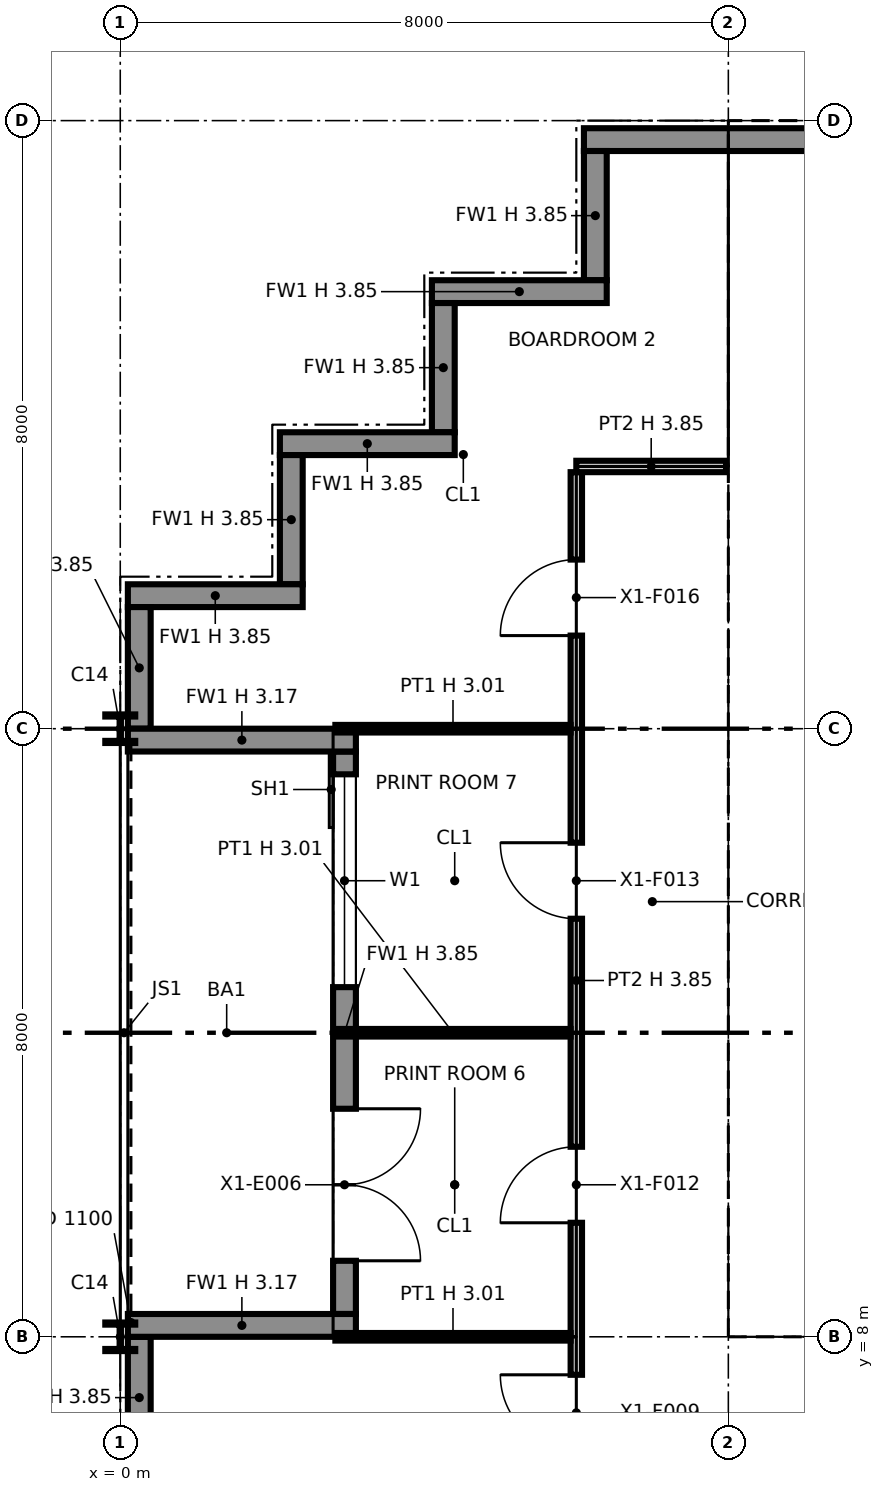
"""IFC4 building model, lengths in metres.
Left out: names, types, materials, properties, quantities, classifications, styles, units other than length and angle.
Written with IfcOpenShell. Run it as: python <this file> out.ifc"""

import sys

from ifc_helpers import new_model, si_unit, direction, frame, frame_2d, origin, origin_2d, place, context, subcontext, project, spatial, polyline, rectangle, i_section, outline, extrude, element, fill, save


model = new_model("IFC4")
c1 = context("Model", 3, precision=1e-05, world=origin(), true_north=direction((0.0, 1.0)))
c2 = subcontext(c1, "Body", "Model", "MODEL_VIEW")
j1 = project(units=[si_unit("LENGTHUNIT", "METRE"), si_unit("PLANEANGLEUNIT", "RADIAN")], contexts=[c1])
p1 = place(None, origin())
s1 = spatial("IfcSite", under=j1, at=p1, CompositionType="ELEMENT")
p2 = place(p1, origin())
s2 = spatial("IfcBuilding", under=s1, at=p2, CompositionType="ELEMENT")
p3 = place(p2, frame((0.0, 0.0, 247.0)))
s3 = spatial("IfcBuildingStorey", under=s2, at=p3, CompositionType="ELEMENT", Elevation=247.0)
for number, where, z_axis, x_axis in (
    (1, (0.0, 8.0, 0.0), (0.0, 0.0, 1.0), (1.0, 0.0, 0.0)),
    (2, (0.0, 16.0, 0.0), (0.0, 0.0, 1.0), (1.0, 0.0, 0.0)),
):
    element("IfcColumn", number, at=place(p3, frame(where, z_axis=z_axis, x_axis=x_axis)), inside=s3, PredefinedType="COLUMN", context=c2, shape_type="SweptSolid", body=[
        extrude(i_section(OverallWidth=0.394, OverallDepth=0.376, WebThickness=0.017, FlangeThickness=0.028, at=origin_2d()), origin(), (0.0, 0.0, 1.0), 3.85),
    ])
for number, where, z_axis, x_axis in (
    (3, (8.0, 8.0, 0.0), (0.0, 0.0, 1.0), (1.0, 0.0, 0.0)),
    (4, (8.0, 16.0, 0.0), (0.0, 0.0, 1.0), (1.0, 0.0, 0.0)),
):
    element("IfcColumn", number, at=place(p3, frame(where, z_axis=z_axis, x_axis=x_axis)), inside=s3, PredefinedType="COLUMN", context=c2, shape_type="SweptSolid", body=[
        extrude(i_section(OverallWidth=0.371, OverallDepth=0.361, WebThickness=0.012, FlangeThickness=0.02, at=origin_2d()), origin(), (0.0, 0.0, 1.0), 3.85),
    ])
p4 = place(p3, frame((8.0, 24.0, 0.0), z_axis=(0.0, 0.0, 1.0), x_axis=(1.0, 0.0, 0.0)))
e5 = element("IfcColumn", 5, at=p4, inside=s3, PredefinedType="COLUMN", context=c2, shape_type="SweptSolid", body=[
    extrude(i_section(OverallWidth=0.401, OverallDepth=0.399, WebThickness=0.025, FlangeThickness=0.04, at=origin_2d()), origin(), (0.0, 0.0, 1.0), 3.85),
])
p5 = place(p3, frame((32.0, 23.75, 0.0), z_axis=(0.0, 0.0, 1.0), x_axis=(-1.0, 0.0, 0.0)))
e6 = element("IfcWall", 6, at=p5, inside=s3, PredefinedType="SOLIDWALL", context=c2, shape_type="SweptSolid", body=[
    extrude(rectangle(XDim=25.9, YDim=0.3, at=frame_2d((12.95, 0.0))), origin(), (0.0, 0.0, 1.0), 3.85),
])
p6 = place(p3, frame((6.25, 23.6, 0.0), z_axis=(0.0, 0.0, 1.0), x_axis=(0.0, -1.0, 0.0)))
e7 = element("IfcWall", 7, at=p6, inside=s3, PredefinedType="SOLIDWALL", context=c2, shape_type="SweptSolid", body=[
    extrude(rectangle(XDim=1.7, YDim=0.3, at=frame_2d((0.85, 0.0))), origin(), (0.0, 0.0, 1.0), 3.85),
])
p7 = place(p3, frame((6.4, 21.75, 0.0), z_axis=(0.0, 0.0, 1.0), x_axis=(-1.0, 0.0, 0.0)))
e8 = element("IfcWall", 8, at=p7, inside=s3, PredefinedType="SOLIDWALL", context=c2, shape_type="SweptSolid", body=[
    extrude(rectangle(XDim=2.3, YDim=0.3, at=frame_2d((1.15, 0.0))), origin(), (0.0, 0.0, 1.0), 3.85),
])
p8 = place(p3, frame((4.25, 21.6, 0.0), z_axis=(0.0, 0.0, 1.0), x_axis=(0.0, -1.0, 0.0)))
e9 = element("IfcWall", 9, at=p8, inside=s3, PredefinedType="SOLIDWALL", context=c2, shape_type="SweptSolid", body=[
    extrude(rectangle(XDim=1.7, YDim=0.3, at=frame_2d((0.85, 0.0))), origin(), (0.0, 0.0, 1.0), 3.85),
])
p9 = place(p3, frame((4.4, 19.75, 0.0), z_axis=(0.0, 0.0, 1.0), x_axis=(-1.0, 0.0, 0.0)))
e10 = element("IfcWall", 10, at=p9, inside=s3, PredefinedType="SOLIDWALL", context=c2, shape_type="SweptSolid", body=[
    extrude(rectangle(XDim=2.3, YDim=0.3, at=frame_2d((1.15, 0.0))), origin(), (0.0, 0.0, 1.0), 3.85),
])
p10 = place(p3, frame((2.25, 19.6, 0.0), z_axis=(0.0, 0.0, 1.0), x_axis=(0.0, -1.0, 0.0)))
e11 = element("IfcWall", 11, at=p10, inside=s3, PredefinedType="SOLIDWALL", context=c2, shape_type="SweptSolid", body=[
    extrude(rectangle(XDim=1.7, YDim=0.3, at=frame_2d((0.85, 0.0))), origin(), (0.0, 0.0, 1.0), 3.85),
])
p11 = place(p3, frame((2.4, 17.75, 0.0), z_axis=(0.0, 0.0, 1.0), x_axis=(-1.0, 0.0, 0.0)))
e12 = element("IfcWall", 12, at=p11, inside=s3, PredefinedType="SOLIDWALL", context=c2, shape_type="SweptSolid", body=[
    extrude(rectangle(XDim=2.3, YDim=0.3, at=frame_2d((1.15, 0.0))), origin(), (0.0, 0.0, 1.0), 3.85),
])
p12 = place(p3, frame((0.25, 17.6, 0.0), z_axis=(0.0, 0.0, 1.0), x_axis=(0.0, -1.0, 0.0)))
e13 = element("IfcWall", 13, at=p12, inside=s3, PredefinedType="SOLIDWALL", context=c2, shape_type="SweptSolid", body=[
    extrude(rectangle(XDim=1.6, YDim=0.3, at=frame_2d((0.8, 0.0))), origin(), (0.0, 0.0, 1.0), 3.85),
])
p13 = place(p3, frame((2.95, 15.7, 0.0), z_axis=(0.0, 0.0, 1.0), x_axis=(0.0, -1.0, 0.0)))
e14 = element("IfcWall", 14, at=p13, inside=s3, PredefinedType="SOLIDWALL", context=c2, shape_type="SweptSolid", body=[
    extrude(rectangle(XDim=7.4, YDim=0.3, at=frame_2d((3.7, 0.0))), origin(), (0.0, 0.0, 1.0), 3.85),
])
p14 = place(p13, frame((0.3, 0.0, 0.9)))
e15 = element("IfcOpeningElement", 15, at=p14, cuts=e14, PredefinedType="OPENING", context=c2, shape_type="SweptSolid", body=[
    extrude(rectangle(XDim=2.8, YDim=2.2, at=frame_2d((1.4, 1.1))), frame((0.0, 0.16, 0.0), z_axis=(0.0, -1.0, 0.0), x_axis=(1.0, 0.0, 0.0)), (0.0, 0.0, 1.0), 0.32),
])
p15 = place(p13, frame((4.7, 0.0, 0.0)))
e16 = element("IfcOpeningElement", 16, at=p15, cuts=e14, PredefinedType="OPENING", context=c2, shape_type="SweptSolid", body=[
    extrude(rectangle(XDim=2.0, YDim=2.4, at=frame_2d((1.0, 1.2))), frame((0.0, 0.16, 0.0), z_axis=(0.0, -1.0, 0.0), x_axis=(1.0, 0.0, 0.0)), (0.0, 0.0, 1.0), 0.32),
])
for number, where, z_axis, x_axis in (
    (17, (0.1, 15.85, 0.0), (0.0, 0.0, 1.0), (1.0, 0.0, 0.0)),
    (18, (0.1, 8.15, 0.0), (0.0, 0.0, 1.0), (1.0, 0.0, 0.0)),
):
    element("IfcWall", number, at=place(p3, frame(where, z_axis=z_axis, x_axis=x_axis)), inside=s3, PredefinedType="SOLIDWALL", context=c2, shape_type="SweptSolid", body=[
        extrude(rectangle(XDim=3.0, YDim=0.3, at=frame_2d((1.5, 0.0))), origin(), (0.0, 0.0, 1.0), 3.171),
    ])
p16 = place(p3, frame((0.25, 8.0, 0.0), z_axis=(0.0, 0.0, 1.0), x_axis=(0.0, -1.0, 0.0)))
e19 = element("IfcWall", 19, at=p16, inside=s3, PredefinedType="SOLIDWALL", context=c2, shape_type="SweptSolid", body=[
    extrude(rectangle(XDim=1.6, YDim=0.3, at=frame_2d((0.8, 0.0))), origin(), (0.0, 0.0, 1.0), 3.85),
])
p17 = place(p3, frame((8.65, 8.75, 0.0), z_axis=(0.0, 0.0, 1.0), x_axis=(1.0, 0.0, 0.0)))
e20 = element("IfcWall", 20, at=p17, inside=s3, PredefinedType="PARTITIONING", context=c2, shape_type="SweptSolid", body=[
    extrude(outline(polyline([(0.0, 0.0), (14.7, 0.0), (14.7, 3.85), (7.438, 3.85), (7.438, 3.308), (7.262, 3.308), (7.261, 3.85), (0.0, 3.85), (0.0, 0.0)])), frame((0.0, 0.1, 0.0), z_axis=(0.0, -1.0, 0.0), x_axis=(1.0, 0.0, 0.0)), (0.0, 0.0, 1.0), 0.2),
])
p18 = place(p17, frame((1.3, 0.0, 0.0)))
e21 = element("IfcOpeningElement", 21, at=p18, cuts=e20, PredefinedType="OPENING", context=c2, shape_type="SweptSolid", body=[
    extrude(rectangle(XDim=1.4, YDim=2.1, at=frame_2d((0.7, 1.05))), frame((0.0, 0.11, 0.0), z_axis=(0.0, -1.0, 0.0), x_axis=(1.0, 0.0, 0.0)), (0.0, 0.0, 1.0), 0.22),
])
p19 = place(p17, frame((4.6, 0.0, 0.0)))
e22 = element("IfcOpeningElement", 22, at=p19, cuts=e20, PredefinedType="OPENING", context=c2, shape_type="SweptSolid", body=[
    extrude(rectangle(XDim=1.4, YDim=2.1, at=frame_2d((0.7, 1.05))), frame((0.0, 0.11, 0.0), z_axis=(0.0, -1.0, 0.0), x_axis=(1.0, 0.0, 0.0)), (0.0, 0.0, 1.0), 0.22),
])
p20 = place(p17, frame((10.4, 0.0, 0.0)))
e23 = element("IfcOpeningElement", 23, at=p20, cuts=e20, PredefinedType="OPENING", context=c2, shape_type="SweptSolid", body=[
    extrude(rectangle(XDim=1.2, YDim=2.1, at=frame_2d((0.6, 1.05))), frame((0.0, 0.11, 0.0), z_axis=(0.0, -1.0, 0.0), x_axis=(1.0, 0.0, 0.0)), (0.0, 0.0, 1.0), 0.22),
])
p21 = place(p3, frame((8.75, 8.85, 0.0), z_axis=(0.0, 0.0, 1.0), x_axis=(0.0, 1.0, 0.0)))
e24 = element("IfcWall", 24, at=p21, inside=s3, PredefinedType="PARTITIONING", context=c2, shape_type="SweptSolid", body=[
    extrude(outline(polyline([(0.0, 0.0), (14.3, 0.0), (14.3, 3.85), (10.225, 3.85), (10.224, 3.44), (10.076, 3.44), (10.075, 3.85), (7.239, 3.85), (7.238, 3.308), (7.062, 3.308), (7.062, 3.85), (0.0, 3.85), (0.0, 0.0)])), frame((0.0, 0.1, 0.0), z_axis=(0.0, -1.0, 0.0), x_axis=(1.0, 0.0, 0.0)), (0.0, 0.0, 1.0), 0.2),
])
p22 = place(p21, frame((8.3, 0.0, 0.0)))
e25 = element("IfcOpeningElement", 25, at=p22, cuts=e24, PredefinedType="OPENING", context=c2, shape_type="SweptSolid", body=[
    extrude(rectangle(XDim=1.8, YDim=2.1, at=frame_2d((0.9, 1.05))), frame((0.0, 0.11, 0.0), z_axis=(0.0, -1.0, 0.0), x_axis=(1.0, 0.0, 0.0)), (0.0, 0.0, 1.0), 0.22),
])
p23 = place(p3, frame((8.65, 23.25, 0.0), z_axis=(0.0, 0.0, 1.0), x_axis=(1.0, 0.0, 0.0)))
e26 = element("IfcWall", 26, at=p23, inside=s3, PredefinedType="PARTITIONING", context=c2, shape_type="SweptSolid", body=[
    extrude(outline(polyline([(0.0, 0.0), (14.7, 0.0), (14.7, 3.85), (7.438, 3.85), (7.438, 3.308), (7.262, 3.308), (7.261, 3.85), (0.0, 3.85), (0.0, 0.0)])), frame((0.0, 0.1, 0.0), z_axis=(0.0, -1.0, 0.0), x_axis=(1.0, 0.0, 0.0)), (0.0, 0.0, 1.0), 0.2),
])
p24 = place(p3, frame((8.85, 16.0, 0.0), z_axis=(0.0, 0.0, 1.0), x_axis=(1.0, 0.0, 0.0)))
e27 = element("IfcWall", 27, at=p24, inside=s3, PredefinedType="PARTITIONING", context=c2, shape_type="SweptSolid", body=[
    extrude(rectangle(XDim=6.954, YDim=0.6, at=frame_2d((3.477, 0.0))), origin(), (0.0, 0.0, 1.0), 3.308),
])
p25 = place(p3, frame((8.85, 19.9, 0.0), z_axis=(0.0, 0.0, 1.0), x_axis=(1.0, 0.0, 0.0)))
e28 = element("IfcWall", 28, at=p25, inside=s3, PredefinedType="PARTITIONING", context=c2, shape_type="SweptSolid", body=[
    extrude(outline(polyline([(0.0, 0.0), (14.3, 0.0), (14.3, 3.85), (7.239, 3.85), (7.238, 3.308), (7.062, 3.308), (7.062, 3.85), (0.0, 3.85), (0.0, 0.0)])), frame((0.0, 0.1, 0.0), z_axis=(0.0, -1.0, 0.0), x_axis=(1.0, 0.0, 0.0)), (0.0, 0.0, 1.0), 0.2),
])
p26 = place(p25, frame((2.125, 0.0, 0.0)))
e29 = element("IfcOpeningElement", 29, at=p26, cuts=e28, PredefinedType="OPENING", context=c2, shape_type="SweptSolid", body=[
    extrude(rectangle(XDim=0.9, YDim=2.1, at=frame_2d((0.45, 1.05))), frame((0.0, 0.11, 0.0), z_axis=(0.0, -1.0, 0.0), x_axis=(1.0, 0.0, 0.0)), (0.0, 0.0, 1.0), 0.22),
])
p27 = place(p25, frame((5.65, 0.0, 0.0)))
e30 = element("IfcOpeningElement", 30, at=p27, cuts=e28, PredefinedType="OPENING", context=c2, shape_type="SweptSolid", body=[
    extrude(rectangle(XDim=1.1, YDim=2.1, at=frame_2d((0.55, 1.05))), frame((0.0, 0.11, 0.0), z_axis=(0.0, -1.0, 0.0), x_axis=(1.0, 0.0, 0.0)), (0.0, 0.0, 1.0), 0.22),
])
p28 = place(p25, frame((7.95, 0.0, 0.0)))
e31 = element("IfcOpeningElement", 31, at=p28, cuts=e28, PredefinedType="OPENING", context=c2, shape_type="SweptSolid", body=[
    extrude(rectangle(XDim=1.1, YDim=2.1, at=frame_2d((0.55, 1.05))), frame((0.0, 0.11, 0.0), z_axis=(0.0, -1.0, 0.0), x_axis=(1.0, 0.0, 0.0)), (0.0, 0.0, 1.0), 0.22),
])
p29 = place(p25, frame((10.25, 0.0, 0.0)))
e32 = element("IfcOpeningElement", 32, at=p29, cuts=e28, PredefinedType="OPENING", context=c2, shape_type="SweptSolid", body=[
    extrude(rectangle(XDim=1.1, YDim=2.1, at=frame_2d((0.55, 1.05))), frame((0.0, 0.11, 0.0), z_axis=(0.0, -1.0, 0.0), x_axis=(1.0, 0.0, 0.0)), (0.0, 0.0, 1.0), 0.22),
])
p30 = place(p25, frame((12.625, 0.0, 0.0)))
e33 = element("IfcOpeningElement", 33, at=p30, cuts=e28, PredefinedType="OPENING", context=c2, shape_type="SweptSolid", body=[
    extrude(rectangle(XDim=1.1, YDim=2.1, at=frame_2d((0.55, 1.05))), frame((0.0, 0.11, 0.0), z_axis=(0.0, -1.0, 0.0), x_axis=(1.0, 0.0, 0.0)), (0.0, 0.0, 1.0), 0.22),
])
p31 = place(p3, frame((6.0, 6.0, 0.0), z_axis=(0.0, 0.0, 1.0), x_axis=(0.0, 1.0, 0.0)))
e34 = element("IfcWall", 34, at=p31, inside=s3, PredefinedType="PARTITIONING", context=c2, shape_type="SweptSolid", body=[
    extrude(outline(polyline([(0.0, 0.0), (13.375, 0.0), (13.375, 3.85), (10.3, 3.85), (10.298, 3.014), (9.702, 3.014), (9.7, 3.85), (6.3, 3.85), (6.298, 3.014), (5.702, 3.014), (5.7, 3.85), (2.3, 3.85), (2.298, 3.014), (1.702, 3.014), (1.7, 3.85), (0.0, 3.85), (0.0, 0.0)])), frame((0.0, 0.075, 0.0), z_axis=(0.0, -1.0, 0.0), x_axis=(1.0, 0.0, 0.0)), (0.0, 0.0, 1.0), 0.15),
])
p32 = place(p31, frame((0.5, 0.0, 0.0)))
e35 = element("IfcOpeningElement", 35, at=p32, cuts=e34, PredefinedType="OPENING", context=c2, shape_type="SweptSolid", body=[
    extrude(rectangle(XDim=1.0, YDim=2.1, at=frame_2d((0.5, 1.05))), frame((0.0, 0.085, 0.0), z_axis=(0.0, -1.0, 0.0), x_axis=(1.0, 0.0, 0.0)), (0.0, 0.0, 1.0), 0.17),
])
p33 = place(p31, frame((3.5, 0.0, 0.0)))
e36 = element("IfcOpeningElement", 36, at=p33, cuts=e34, PredefinedType="OPENING", context=c2, shape_type="SweptSolid", body=[
    extrude(rectangle(XDim=1.0, YDim=2.1, at=frame_2d((0.5, 1.05))), frame((0.0, 0.085, 0.0), z_axis=(0.0, -1.0, 0.0), x_axis=(1.0, 0.0, 0.0)), (0.0, 0.0, 1.0), 0.17),
])
p34 = place(p31, frame((7.5, 0.0, 0.0)))
e37 = element("IfcOpeningElement", 37, at=p34, cuts=e34, PredefinedType="OPENING", context=c2, shape_type="SweptSolid", body=[
    extrude(rectangle(XDim=1.0, YDim=2.1, at=frame_2d((0.5, 1.05))), frame((0.0, 0.085, 0.0), z_axis=(0.0, -1.0, 0.0), x_axis=(1.0, 0.0, 0.0)), (0.0, 0.0, 1.0), 0.17),
])
p35 = place(p31, frame((11.225, 0.0, 0.0)))
e38 = element("IfcOpeningElement", 38, at=p35, cuts=e34, PredefinedType="OPENING", context=c2, shape_type="SweptSolid", body=[
    extrude(rectangle(XDim=1.0, YDim=2.1, at=frame_2d((0.5, 1.05))), frame((0.0, 0.085, 0.0), z_axis=(0.0, -1.0, 0.0), x_axis=(1.0, 0.0, 0.0)), (0.0, 0.0, 1.0), 0.17),
])
for number, where, z_axis, x_axis in (
    (39, (2.83, 8.0, 0.0), (0.0, 0.0, 1.0), (1.0, 0.0, 0.0)),
    (40, (2.83, 12.0, 0.0), (0.0, 0.0, 1.0), (1.0, 0.0, 0.0)),
    (41, (2.83, 16.0, 0.0), (0.0, 0.0, 1.0), (1.0, 0.0, 0.0)),
):
    element("IfcWall", number, at=place(p3, frame(where, z_axis=z_axis, x_axis=x_axis)), inside=s3, PredefinedType="PARTITIONING", context=c2, shape_type="SweptSolid", body=[
        extrude(rectangle(XDim=3.095, YDim=0.1, at=frame_2d((1.547, 0.0))), origin(), (0.0, 0.0, 1.0), 3.014),
    ])
p36 = place(p3, frame((6.0, 19.45, 0.0), z_axis=(0.0, 0.0, 1.0), x_axis=(1.0, 0.0, 0.0)))
e42 = element("IfcWall", 42, at=p36, inside=s3, PredefinedType="PARTITIONING", context=c2, shape_type="SweptSolid", body=[
    extrude(rectangle(XDim=1.97, YDim=0.15, at=frame_2d((0.985, 0.0))), origin(), (0.0, 0.0, 1.0), 3.85),
])
p37 = place(p14, origin())
e43 = element("IfcWindow", 43, at=p37, inside=s3, PartitioningType="SINGLE_PANEL", PredefinedType="WINDOW", context=c2, shape_type="SweptSolid", body=[
    extrude(rectangle(XDim=2.8, YDim=2.2, at=frame_2d((1.4, 1.1))), frame((0.0, 0.03, 0.0), z_axis=(0.0, -1.0, 0.0), x_axis=(1.0, 0.0, 0.0)), (0.0, 0.0, 1.0), 0.06),
])
fill(e15, e43)
p38 = place(p15, origin())
e44 = element("IfcDoor", 44, at=p38, inside=s3, OperationType="DOUBLE_DOOR_SINGLE_SWING", PredefinedType="DOOR", context=c2, shape_type="SweptSolid", body=[
    extrude(rectangle(XDim=2.0, YDim=2.4, at=frame_2d((1.0, 1.2))), frame((0.0, 0.025, 0.0), z_axis=(0.0, -1.0, 0.0), x_axis=(1.0, 0.0, 0.0)), (0.0, 0.0, 1.0), 0.05),
])
fill(e16, e44)
p39 = place(p22, origin())
e45 = element("IfcDoor", 45, at=p39, inside=s3, OperationType="DOUBLE_DOOR_SINGLE_SWING", PredefinedType="NOTDEFINED", context=c2, shape_type="SweptSolid", body=[
    extrude(rectangle(XDim=1.8, YDim=2.1, at=frame_2d((0.9, 1.05))), frame((0.0, 0.025, 0.0), z_axis=(0.0, -1.0, 0.0), x_axis=(1.0, 0.0, 0.0)), (0.0, 0.0, 1.0), 0.05),
])
fill(e25, e45)
p40 = place(p32, origin())
e46 = element("IfcDoor", 46, at=p40, inside=s3, OperationType="SINGLE_SWING_RIGHT", PredefinedType="DOOR", context=c2, shape_type="SweptSolid", body=[
    extrude(rectangle(XDim=1.0, YDim=2.1, at=frame_2d((0.5, 1.05))), frame((0.0, 0.025, 0.0), z_axis=(0.0, -1.0, 0.0), x_axis=(1.0, 0.0, 0.0)), (0.0, 0.0, 1.0), 0.05),
])
fill(e35, e46)
p41 = place(p33, origin())
e47 = element("IfcDoor", 47, at=p41, inside=s3, OperationType="SINGLE_SWING_LEFT", PredefinedType="DOOR", context=c2, shape_type="SweptSolid", body=[
    extrude(rectangle(XDim=1.0, YDim=2.1, at=frame_2d((0.5, 1.05))), frame((0.0, 0.025, 0.0), z_axis=(0.0, -1.0, 0.0), x_axis=(1.0, 0.0, 0.0)), (0.0, 0.0, 1.0), 0.05),
])
fill(e36, e47)
p42 = place(p34, origin())
e48 = element("IfcDoor", 48, at=p42, inside=s3, OperationType="SINGLE_SWING_RIGHT", PredefinedType="DOOR", context=c2, shape_type="SweptSolid", body=[
    extrude(rectangle(XDim=1.0, YDim=2.1, at=frame_2d((0.5, 1.05))), frame((0.0, 0.025, 0.0), z_axis=(0.0, -1.0, 0.0), x_axis=(1.0, 0.0, 0.0)), (0.0, 0.0, 1.0), 0.05),
])
fill(e37, e48)
p43 = place(p35, origin())
e49 = element("IfcDoor", 49, at=p43, inside=s3, OperationType="SINGLE_SWING_LEFT", PredefinedType="DOOR", context=c2, shape_type="SweptSolid", body=[
    extrude(rectangle(XDim=1.0, YDim=2.1, at=frame_2d((0.5, 1.05))), frame((0.0, 0.025, 0.0), z_axis=(0.0, -1.0, 0.0), x_axis=(1.0, 0.0, 0.0)), (0.0, 0.0, 1.0), 0.05),
])
fill(e38, e49)
save(model, sys.argv[1])
